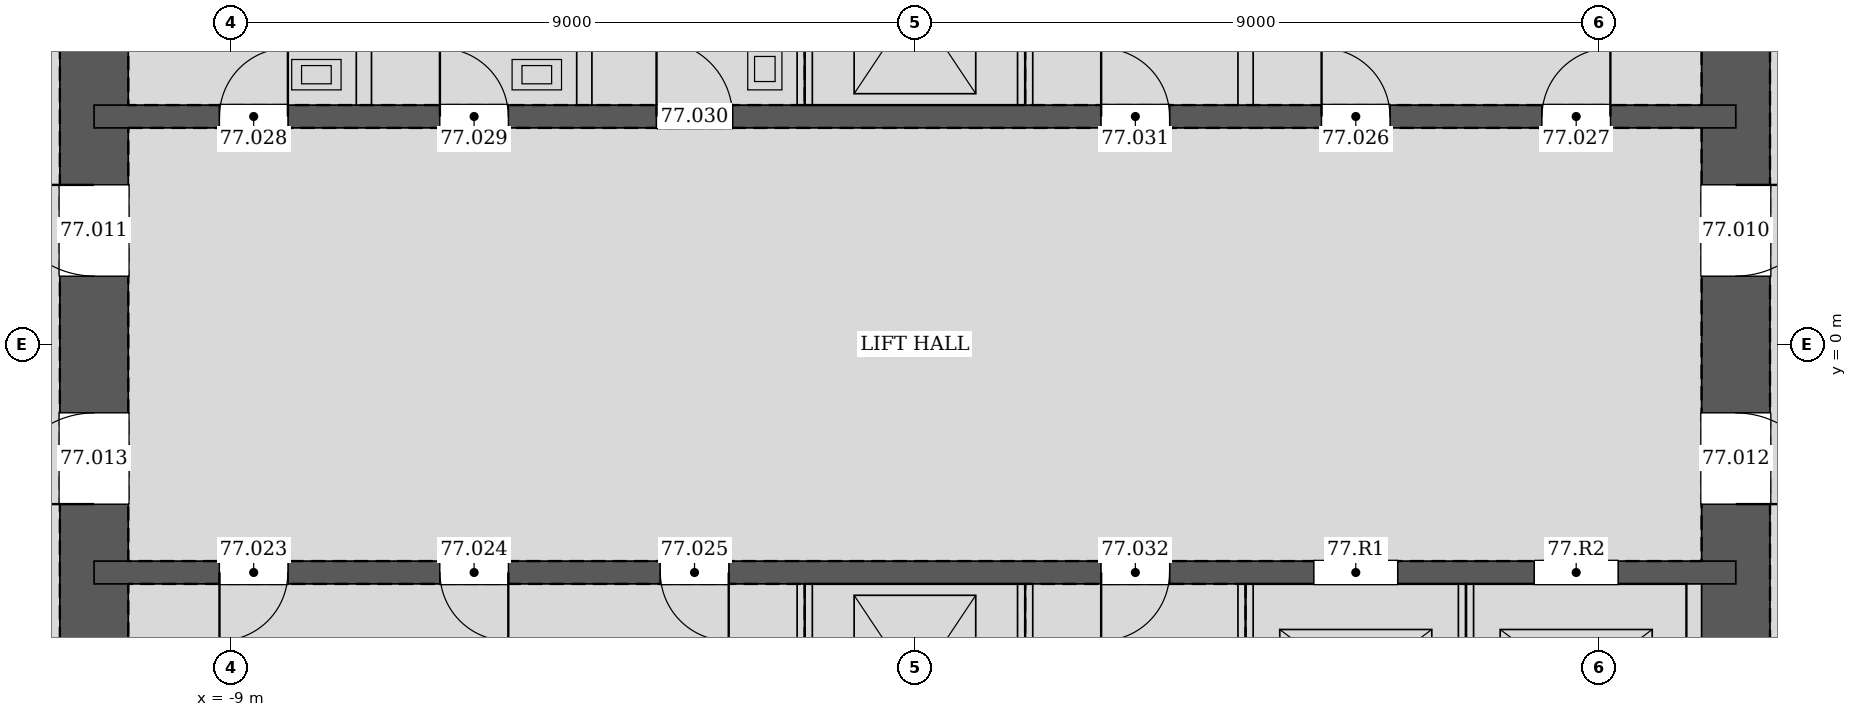
"""IFC4 building model, lengths in metres.
Left out: names, types, materials, properties, quantities, classifications, styles, units other than length and angle.
Written with IfcOpenShell. Run it as: python <this file> out.ifc"""

import sys

from ifc_helpers import new_model, si_unit, direction, frame, frame_2d, origin, place, context, subcontext, project, spatial, rectangle, extrude, element, fill, save


model = new_model("IFC4")
c1 = context("Model", 3, precision=1e-05, world=origin(), true_north=direction((0.0, 1.0)))
c2 = subcontext(c1, "Body", "Model", "MODEL_VIEW")
j1 = project(units=[si_unit("LENGTHUNIT", "METRE"), si_unit("PLANEANGLEUNIT", "RADIAN")], contexts=[c1])
p1 = place(None, origin())
s1 = spatial("IfcSite", under=j1, at=p1, CompositionType="ELEMENT")
p2 = place(p1, origin())
s2 = spatial("IfcBuilding", under=s1, at=p2, CompositionType="ELEMENT")
p3 = place(p2, frame((0.0, 0.0, 311.6)))
s3 = spatial("IfcBuildingStorey", under=s2, at=p3, CompositionType="ELEMENT", Elevation=311.6)
p4 = place(p3, frame((10.8, -10.8, 0.0), z_axis=(0.0, 0.0, 1.0), x_axis=(0.0, 1.0, 0.0)))
e1 = element("IfcWall", 1, at=p4, inside=s3, PredefinedType="SOLIDWALL", context=c2, shape_type="SweptSolid", body=[
    extrude(rectangle(XDim=21.6, YDim=0.9, at=frame_2d((10.8, 0.0))), origin(), (0.0, 0.0, 1.0), 6.0),
])
p5 = place(p4, frame((11.7, 0.0, 0.0)))
e2 = element("IfcOpeningElement", 2, at=p5, cuts=e1, PredefinedType="OPENING", context=c2, shape_type="SweptSolid", body=[
    extrude(rectangle(XDim=1.2, YDim=2.1, at=frame_2d((0.6, 1.05))), frame((0.0, 0.46, 0.0), z_axis=(0.0, -1.0, 0.0), x_axis=(1.0, 0.0, 0.0)), (0.0, 0.0, 1.0), 0.92),
])
p6 = place(p4, frame((8.7, 0.0, 0.0)))
e3 = element("IfcOpeningElement", 3, at=p6, cuts=e1, PredefinedType="OPENING", context=c2, shape_type="SweptSolid", body=[
    extrude(rectangle(XDim=1.2, YDim=2.1, at=frame_2d((0.6, 1.05))), frame((0.0, 0.46, 0.0), z_axis=(0.0, -1.0, 0.0), x_axis=(1.0, 0.0, 0.0)), (0.0, 0.0, 1.0), 0.92),
])
p7 = place(p3, frame((-10.8, 10.8, 0.0), z_axis=(0.0, 0.0, 1.0), x_axis=(0.0, -1.0, 0.0)))
e4 = element("IfcWall", 4, at=p7, inside=s3, PredefinedType="SOLIDWALL", context=c2, shape_type="SweptSolid", body=[
    extrude(rectangle(XDim=21.6, YDim=0.9, at=frame_2d((10.8, 0.0))), origin(), (0.0, 0.0, 1.0), 6.0),
])
p8 = place(p7, frame((8.7, 0.0, 0.0)))
e5 = element("IfcOpeningElement", 5, at=p8, cuts=e4, PredefinedType="OPENING", context=c2, shape_type="SweptSolid", body=[
    extrude(rectangle(XDim=1.2, YDim=2.1, at=frame_2d((0.6, 1.05))), frame((0.0, 0.46, 0.0), z_axis=(0.0, -1.0, 0.0), x_axis=(1.0, 0.0, 0.0)), (0.0, 0.0, 1.0), 0.92),
])
p9 = place(p7, frame((11.7, 0.0, 0.0)))
e6 = element("IfcOpeningElement", 6, at=p9, cuts=e4, PredefinedType="OPENING", context=c2, shape_type="SweptSolid", body=[
    extrude(rectangle(XDim=1.2, YDim=2.1, at=frame_2d((0.6, 1.05))), frame((0.0, 0.46, 0.0), z_axis=(0.0, -1.0, 0.0), x_axis=(1.0, 0.0, 0.0)), (0.0, 0.0, 1.0), 0.92),
])
p10 = place(p3, frame((-10.8, 3.0, 0.0), z_axis=(0.0, 0.0, 1.0), x_axis=(1.0, 0.0, 0.0)))
e7 = element("IfcWall", 7, at=p10, inside=s3, PredefinedType="SOLIDWALL", context=c2, shape_type="SweptSolid", body=[
    extrude(rectangle(XDim=21.6, YDim=0.3, at=frame_2d((10.8, 0.0))), origin(), (0.0, 0.0, 1.0), 6.0),
])
p11 = place(p10, frame((16.15, 0.0, 0.0)))
e8 = element("IfcOpeningElement", 8, at=p11, cuts=e7, PredefinedType="OPENING", context=c2, shape_type="SweptSolid", body=[
    extrude(rectangle(XDim=0.9, YDim=2.1, at=frame_2d((0.45, 1.05))), frame((0.0, 0.16, 0.0), z_axis=(0.0, -1.0, 0.0), x_axis=(1.0, 0.0, 0.0)), (0.0, 0.0, 1.0), 0.32),
])
p12 = place(p10, frame((19.05, 0.0, 0.0)))
e9 = element("IfcOpeningElement", 9, at=p12, cuts=e7, PredefinedType="OPENING", context=c2, shape_type="SweptSolid", body=[
    extrude(rectangle(XDim=0.9, YDim=2.1, at=frame_2d((0.45, 1.05))), frame((0.0, 0.16, 0.0), z_axis=(0.0, -1.0, 0.0), x_axis=(1.0, 0.0, 0.0)), (0.0, 0.0, 1.0), 0.32),
])
p13 = place(p10, frame((1.65, 0.0, 0.0)))
e10 = element("IfcOpeningElement", 10, at=p13, cuts=e7, PredefinedType="OPENING", context=c2, shape_type="SweptSolid", body=[
    extrude(rectangle(XDim=0.9, YDim=2.1, at=frame_2d((0.45, 1.05))), frame((0.0, 0.16, 0.0), z_axis=(0.0, -1.0, 0.0), x_axis=(1.0, 0.0, 0.0)), (0.0, 0.0, 1.0), 0.32),
])
p14 = place(p10, frame((4.55, 0.0, 0.0)))
e11 = element("IfcOpeningElement", 11, at=p14, cuts=e7, PredefinedType="OPENING", context=c2, shape_type="SweptSolid", body=[
    extrude(rectangle(XDim=0.9, YDim=2.1, at=frame_2d((0.45, 1.05))), frame((0.0, 0.16, 0.0), z_axis=(0.0, -1.0, 0.0), x_axis=(1.0, 0.0, 0.0)), (0.0, 0.0, 1.0), 0.32),
])
p15 = place(p10, frame((7.4, 0.0, 0.0)))
e12 = element("IfcOpeningElement", 12, at=p15, cuts=e7, PredefinedType="OPENING", context=c2, shape_type="SweptSolid", body=[
    extrude(rectangle(XDim=1.0, YDim=2.1, at=frame_2d((0.5, 1.05))), frame((0.0, 0.16, 0.0), z_axis=(0.0, -1.0, 0.0), x_axis=(1.0, 0.0, 0.0)), (0.0, 0.0, 1.0), 0.32),
])
p16 = place(p10, frame((13.25, 0.0, 0.0)))
e13 = element("IfcOpeningElement", 13, at=p16, cuts=e7, PredefinedType="OPENING", context=c2, shape_type="SweptSolid", body=[
    extrude(rectangle(XDim=0.9, YDim=2.1, at=frame_2d((0.45, 1.05))), frame((0.0, 0.16, 0.0), z_axis=(0.0, -1.0, 0.0), x_axis=(1.0, 0.0, 0.0)), (0.0, 0.0, 1.0), 0.32),
])
p17 = place(p3, frame((-10.8, -3.0, 0.0), z_axis=(0.0, 0.0, 1.0), x_axis=(1.0, 0.0, 0.0)))
e14 = element("IfcWall", 14, at=p17, inside=s3, PredefinedType="SOLIDWALL", context=c2, shape_type="SweptSolid", body=[
    extrude(rectangle(XDim=21.6, YDim=0.3, at=frame_2d((10.8, 0.0))), origin(), (0.0, 0.0, 1.0), 6.0),
])
p18 = place(p17, frame((1.65, 0.0, 0.0)))
e15 = element("IfcOpeningElement", 15, at=p18, cuts=e14, PredefinedType="OPENING", context=c2, shape_type="SweptSolid", body=[
    extrude(rectangle(XDim=0.9, YDim=2.1, at=frame_2d((0.45, 1.05))), frame((0.0, 0.16, 0.0), z_axis=(0.0, -1.0, 0.0), x_axis=(1.0, 0.0, 0.0)), (0.0, 0.0, 1.0), 0.32),
])
p19 = place(p17, frame((4.55, 0.0, 0.0)))
e16 = element("IfcOpeningElement", 16, at=p19, cuts=e14, PredefinedType="OPENING", context=c2, shape_type="SweptSolid", body=[
    extrude(rectangle(XDim=0.9, YDim=2.1, at=frame_2d((0.45, 1.05))), frame((0.0, 0.16, 0.0), z_axis=(0.0, -1.0, 0.0), x_axis=(1.0, 0.0, 0.0)), (0.0, 0.0, 1.0), 0.32),
])
p20 = place(p17, frame((7.45, 0.0, 0.0)))
e17 = element("IfcOpeningElement", 17, at=p20, cuts=e14, PredefinedType="OPENING", context=c2, shape_type="SweptSolid", body=[
    extrude(rectangle(XDim=0.9, YDim=2.1, at=frame_2d((0.45, 1.05))), frame((0.0, 0.16, 0.0), z_axis=(0.0, -1.0, 0.0), x_axis=(1.0, 0.0, 0.0)), (0.0, 0.0, 1.0), 0.32),
])
p21 = place(p17, frame((13.25, 0.0, 0.0)))
e18 = element("IfcOpeningElement", 18, at=p21, cuts=e14, PredefinedType="OPENING", context=c2, shape_type="SweptSolid", body=[
    extrude(rectangle(XDim=0.9, YDim=2.1, at=frame_2d((0.45, 1.05))), frame((0.0, 0.16, 0.0), z_axis=(0.0, -1.0, 0.0), x_axis=(1.0, 0.0, 0.0)), (0.0, 0.0, 1.0), 0.32),
])
p22 = place(p17, frame((16.05, 0.0, 0.0)))
e19 = element("IfcOpeningElement", 19, at=p22, cuts=e14, PredefinedType="OPENING", context=c2, shape_type="SweptSolid", body=[
    extrude(rectangle(XDim=1.1, YDim=2.1, at=frame_2d((0.55, 1.05))), frame((0.0, 0.16, 0.0), z_axis=(0.0, -1.0, 0.0), x_axis=(1.0, 0.0, 0.0)), (0.0, 0.0, 1.0), 0.32),
])
p23 = place(p17, frame((18.95, 0.0, 0.0)))
e20 = element("IfcOpeningElement", 20, at=p23, cuts=e14, PredefinedType="OPENING", context=c2, shape_type="SweptSolid", body=[
    extrude(rectangle(XDim=1.1, YDim=2.1, at=frame_2d((0.55, 1.05))), frame((0.0, 0.16, 0.0), z_axis=(0.0, -1.0, 0.0), x_axis=(1.0, 0.0, 0.0)), (0.0, 0.0, 1.0), 0.32),
])
for number, where, z_axis, x_axis in (
    (21, (-7.25, 3.15, 0.0), (0.0, 0.0, 1.0), (0.0, 1.0, 0.0)),
    (22, (-4.35, 3.15, 0.0), (0.0, 0.0, 1.0), (0.0, 1.0, 0.0)),
    (23, (-1.45, 3.15, 0.0), (0.0, 0.0, 1.0), (0.0, 1.0, 0.0)),
    (24, (1.45, 3.15, 0.0), (0.0, 0.0, 1.0), (0.0, 1.0, 0.0)),
    (25, (4.35, 3.15, 0.0), (0.0, 0.0, 1.0), (0.0, 1.0, 0.0)),
    (26, (-1.45, -5.85, 0.0), (0.0, 0.0, 1.0), (0.0, 1.0, 0.0)),
    (27, (1.45, -5.85, 0.0), (0.0, 0.0, 1.0), (0.0, 1.0, 0.0)),
    (28, (4.35, -5.85, 0.0), (0.0, 0.0, 1.0), (0.0, 1.0, 0.0)),
    (29, (7.25, -5.85, 0.0), (0.0, 0.0, 1.0), (0.0, 1.0, 0.0)),
):
    element("IfcWall", number, at=place(p3, frame(where, z_axis=z_axis, x_axis=x_axis)), inside=s3, PredefinedType="PARTITIONING", context=c2, shape_type="SweptSolid", body=[
        extrude(rectangle(XDim=2.7, YDim=0.2, at=frame_2d((1.35, 0.0))), origin(), (0.0, 0.0, 1.0), 5.75),
    ])
p24 = place(p5, frame((1.2, 0.0, 0.0), z_axis=(0.0, 0.0, 1.0), x_axis=(-1.0, 0.0, 0.0)))
e30 = element("IfcDoor", 30, at=p24, inside=s3, OperationType="SINGLE_SWING_LEFT", PredefinedType="DOOR", context=c2, shape_type="SweptSolid", body=[
    extrude(rectangle(XDim=1.2, YDim=2.1, at=frame_2d((0.6, 1.05))), frame((0.0, 0.025, 0.0), z_axis=(0.0, -1.0, 0.0), x_axis=(1.0, 0.0, 0.0)), (0.0, 0.0, 1.0), 0.05),
])
fill(e2, e30)
p25 = place(p8, frame((1.2, 0.0, 0.0), z_axis=(0.0, 0.0, 1.0), x_axis=(-1.0, 0.0, 0.0)))
e31 = element("IfcDoor", 31, at=p25, inside=s3, OperationType="SINGLE_SWING_RIGHT", PredefinedType="DOOR", context=c2, shape_type="SweptSolid", body=[
    extrude(rectangle(XDim=1.2, YDim=2.1, at=frame_2d((0.6, 1.05))), frame((0.0, 0.025, 0.0), z_axis=(0.0, -1.0, 0.0), x_axis=(1.0, 0.0, 0.0)), (0.0, 0.0, 1.0), 0.05),
])
fill(e5, e31)
p26 = place(p6, frame((1.2, 0.0, 0.0), z_axis=(0.0, 0.0, 1.0), x_axis=(-1.0, 0.0, 0.0)))
e32 = element("IfcDoor", 32, at=p26, inside=s3, OperationType="SINGLE_SWING_RIGHT", PredefinedType="DOOR", context=c2, shape_type="SweptSolid", body=[
    extrude(rectangle(XDim=1.2, YDim=2.1, at=frame_2d((0.6, 1.05))), frame((0.0, 0.025, 0.0), z_axis=(0.0, -1.0, 0.0), x_axis=(1.0, 0.0, 0.0)), (0.0, 0.0, 1.0), 0.05),
])
fill(e3, e32)
p27 = place(p9, frame((1.2, 0.0, 0.0), z_axis=(0.0, 0.0, 1.0), x_axis=(-1.0, 0.0, 0.0)))
e33 = element("IfcDoor", 33, at=p27, inside=s3, OperationType="SINGLE_SWING_LEFT", PredefinedType="DOOR", context=c2, shape_type="SweptSolid", body=[
    extrude(rectangle(XDim=1.2, YDim=2.1, at=frame_2d((0.6, 1.05))), frame((0.0, 0.025, 0.0), z_axis=(0.0, -1.0, 0.0), x_axis=(1.0, 0.0, 0.0)), (0.0, 0.0, 1.0), 0.05),
])
fill(e6, e33)
p28 = place(p18, frame((0.9, 0.0, 0.0), z_axis=(0.0, 0.0, 1.0), x_axis=(-1.0, 0.0, 0.0)))
e34 = element("IfcDoor", 34, at=p28, inside=s3, OperationType="SINGLE_SWING_RIGHT", PredefinedType="DOOR", context=c2, shape_type="SweptSolid", body=[
    extrude(rectangle(XDim=0.9, YDim=2.1, at=frame_2d((0.45, 1.05))), frame((0.0, 0.025, 0.0), z_axis=(0.0, -1.0, 0.0), x_axis=(1.0, 0.0, 0.0)), (0.0, 0.0, 1.0), 0.05),
])
fill(e15, e34)
p29 = place(p19, frame((0.9, 0.0, 0.0), z_axis=(0.0, 0.0, 1.0), x_axis=(-1.0, 0.0, 0.0)))
e35 = element("IfcDoor", 35, at=p29, inside=s3, OperationType="SINGLE_SWING_LEFT", PredefinedType="DOOR", context=c2, shape_type="SweptSolid", body=[
    extrude(rectangle(XDim=0.9, YDim=2.1, at=frame_2d((0.45, 1.05))), frame((0.0, 0.025, 0.0), z_axis=(0.0, -1.0, 0.0), x_axis=(1.0, 0.0, 0.0)), (0.0, 0.0, 1.0), 0.05),
])
fill(e16, e35)
p30 = place(p20, frame((0.9, 0.0, 0.0), z_axis=(0.0, 0.0, 1.0), x_axis=(-1.0, 0.0, 0.0)))
e36 = element("IfcDoor", 36, at=p30, inside=s3, OperationType="SINGLE_SWING_LEFT", PredefinedType="DOOR", context=c2, shape_type="SweptSolid", body=[
    extrude(rectangle(XDim=0.9, YDim=2.1, at=frame_2d((0.45, 1.05))), frame((0.0, 0.025, 0.0), z_axis=(0.0, -1.0, 0.0), x_axis=(1.0, 0.0, 0.0)), (0.0, 0.0, 1.0), 0.05),
])
fill(e17, e36)
p31 = place(p11, origin())
e37 = element("IfcDoor", 37, at=p31, inside=s3, OperationType="SINGLE_SWING_LEFT", PredefinedType="DOOR", context=c2, shape_type="SweptSolid", body=[
    extrude(rectangle(XDim=0.9, YDim=2.1, at=frame_2d((0.45, 1.05))), frame((0.0, 0.025, 0.0), z_axis=(0.0, -1.0, 0.0), x_axis=(1.0, 0.0, 0.0)), (0.0, 0.0, 1.0), 0.05),
])
fill(e8, e37)
p32 = place(p12, origin())
e38 = element("IfcDoor", 38, at=p32, inside=s3, OperationType="SINGLE_SWING_RIGHT", PredefinedType="DOOR", context=c2, shape_type="SweptSolid", body=[
    extrude(rectangle(XDim=0.9, YDim=2.1, at=frame_2d((0.45, 1.05))), frame((0.0, 0.025, 0.0), z_axis=(0.0, -1.0, 0.0), x_axis=(1.0, 0.0, 0.0)), (0.0, 0.0, 1.0), 0.05),
])
fill(e9, e38)
p33 = place(p13, origin())
e39 = element("IfcDoor", 39, at=p33, inside=s3, OperationType="SINGLE_SWING_RIGHT", PredefinedType="DOOR", context=c2, shape_type="SweptSolid", body=[
    extrude(rectangle(XDim=0.9, YDim=2.1, at=frame_2d((0.45, 1.05))), frame((0.0, 0.025, 0.0), z_axis=(0.0, -1.0, 0.0), x_axis=(1.0, 0.0, 0.0)), (0.0, 0.0, 1.0), 0.05),
])
fill(e10, e39)
p34 = place(p14, origin())
e40 = element("IfcDoor", 40, at=p34, inside=s3, OperationType="SINGLE_SWING_LEFT", PredefinedType="DOOR", context=c2, shape_type="SweptSolid", body=[
    extrude(rectangle(XDim=0.9, YDim=2.1, at=frame_2d((0.45, 1.05))), frame((0.0, 0.025, 0.0), z_axis=(0.0, -1.0, 0.0), x_axis=(1.0, 0.0, 0.0)), (0.0, 0.0, 1.0), 0.05),
])
fill(e11, e40)
p35 = place(p15, origin())
e41 = element("IfcDoor", 41, at=p35, inside=s3, OperationType="SINGLE_SWING_LEFT", PredefinedType="DOOR", context=c2, shape_type="SweptSolid", body=[
    extrude(rectangle(XDim=1.0, YDim=2.1, at=frame_2d((0.5, 1.05))), frame((0.0, 0.025, 0.0), z_axis=(0.0, -1.0, 0.0), x_axis=(1.0, 0.0, 0.0)), (0.0, 0.0, 1.0), 0.05),
])
fill(e12, e41)
p36 = place(p16, origin())
e42 = element("IfcDoor", 42, at=p36, inside=s3, OperationType="SINGLE_SWING_LEFT", PredefinedType="DOOR", context=c2, shape_type="SweptSolid", body=[
    extrude(rectangle(XDim=0.9, YDim=2.1, at=frame_2d((0.45, 1.05))), frame((0.0, 0.025, 0.0), z_axis=(0.0, -1.0, 0.0), x_axis=(1.0, 0.0, 0.0)), (0.0, 0.0, 1.0), 0.05),
])
fill(e13, e42)
p37 = place(p21, frame((0.9, 0.0, 0.0), z_axis=(0.0, 0.0, 1.0), x_axis=(-1.0, 0.0, 0.0)))
e43 = element("IfcDoor", 43, at=p37, inside=s3, OperationType="SINGLE_SWING_RIGHT", PredefinedType="DOOR", context=c2, shape_type="SweptSolid", body=[
    extrude(rectangle(XDim=0.9, YDim=2.1, at=frame_2d((0.45, 1.05))), frame((0.0, 0.025, 0.0), z_axis=(0.0, -1.0, 0.0), x_axis=(1.0, 0.0, 0.0)), (0.0, 0.0, 1.0), 0.05),
])
fill(e18, e43)
p38 = place(p22, origin())
e44 = element("IfcDoor", 44, at=p38, inside=s3, OperationType="DOUBLE_DOOR_SLIDING", PredefinedType="DOOR", context=c2, shape_type="SweptSolid", body=[
    extrude(rectangle(XDim=1.1, YDim=2.1, at=frame_2d((0.55, 1.05))), frame((0.0, 0.025, 0.0), z_axis=(0.0, -1.0, 0.0), x_axis=(1.0, 0.0, 0.0)), (0.0, 0.0, 1.0), 0.05),
])
fill(e19, e44)
p39 = place(p23, origin())
e45 = element("IfcDoor", 45, at=p39, inside=s3, OperationType="DOUBLE_DOOR_SLIDING", PredefinedType="DOOR", context=c2, shape_type="SweptSolid", body=[
    extrude(rectangle(XDim=1.1, YDim=2.1, at=frame_2d((0.55, 1.05))), frame((0.0, 0.025, 0.0), z_axis=(0.0, -1.0, 0.0), x_axis=(1.0, 0.0, 0.0)), (0.0, 0.0, 1.0), 0.05),
])
fill(e20, e45)
save(model, sys.argv[1])
